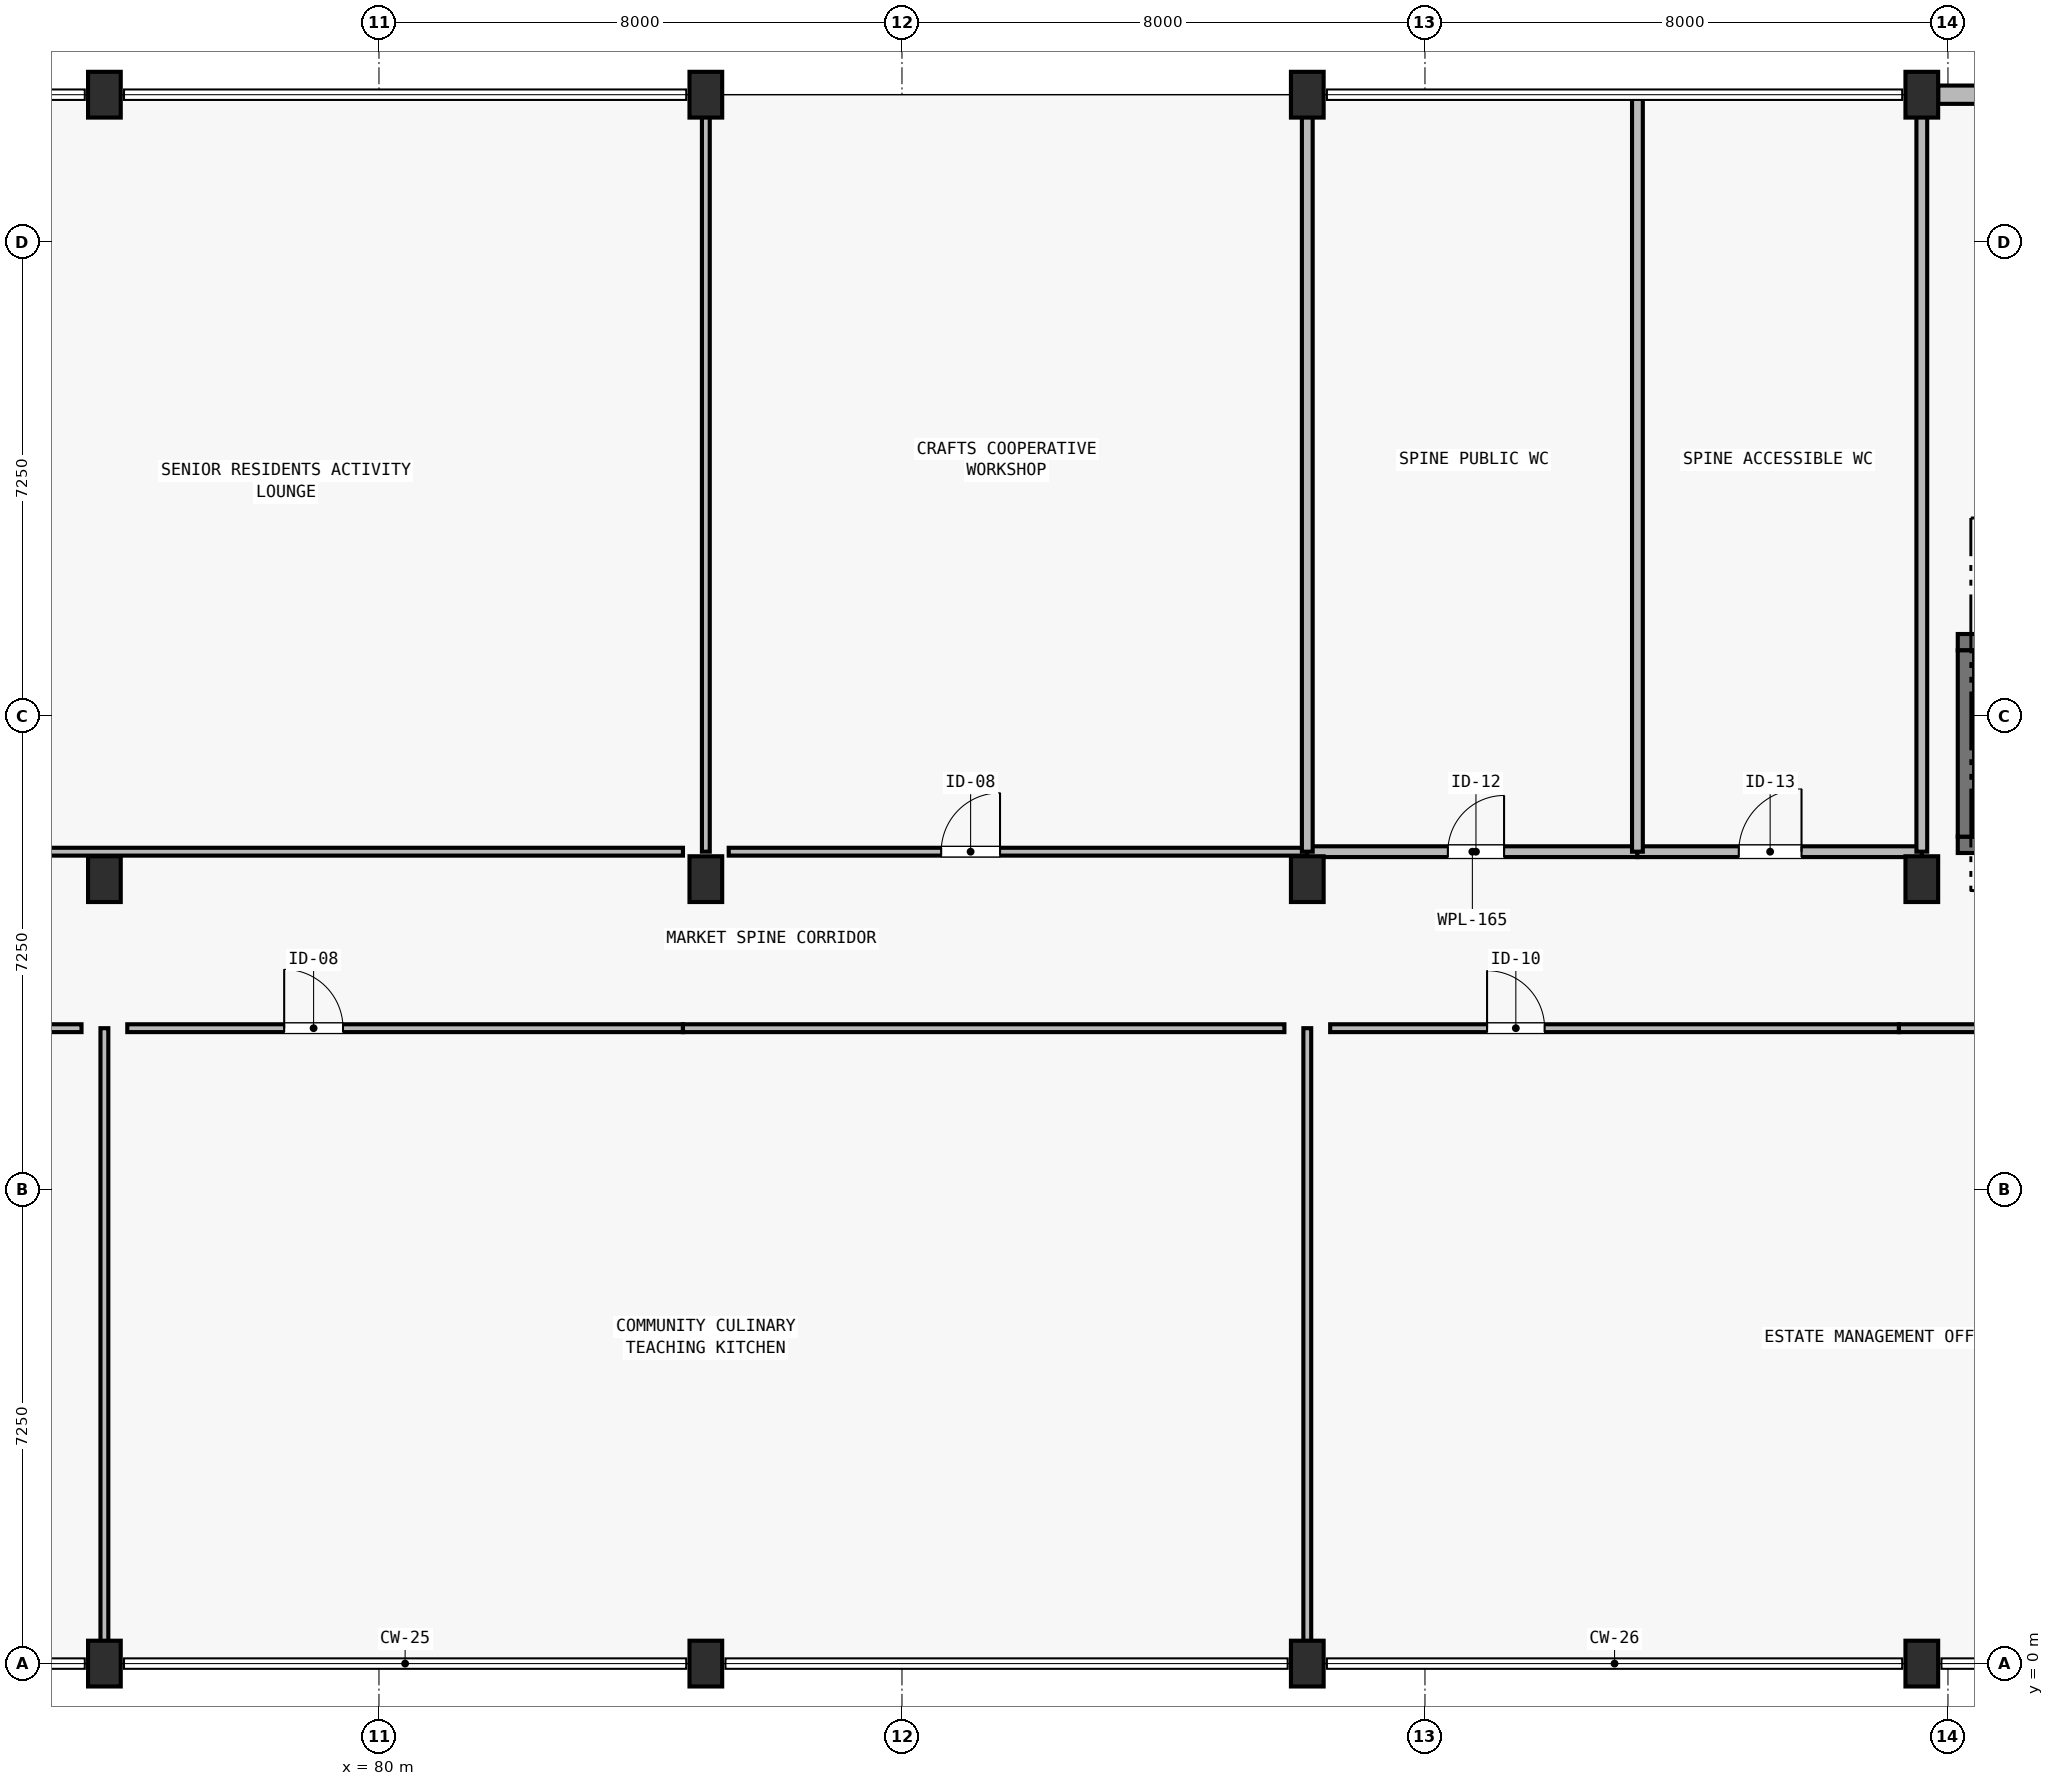
"""IFC4 building model, lengths in metres.
Left out: names, types, materials, properties, quantities, classifications, styles, units other than length and angle.
Written with IfcOpenShell. Run it as: python <this file> out.ifc"""

import sys

from ifc_helpers import new_model, si_unit, direction, frame, frame_2d, origin, origin_2d, place, context, subcontext, project, spatial, rectangle, extrude, element, fill, save


model = new_model("IFC4")
c1 = context("Model", 3, precision=1e-05, world=origin(), true_north=direction((0.0, 1.0)))
c2 = subcontext(c1, "Body", "Model", "MODEL_VIEW")
j1 = project(units=[si_unit("LENGTHUNIT", "METRE"), si_unit("PLANEANGLEUNIT", "RADIAN")], contexts=[c1])
p1 = place(None, origin())
s1 = spatial("IfcSite", under=j1, at=p1, CompositionType="ELEMENT")
p2 = place(p1, origin())
s2 = spatial("IfcBuilding", under=s1, at=p2, CompositionType="ELEMENT")
p3 = place(p2, frame((0.0, 0.0, 4.5)))
s3 = spatial("IfcBuildingStorey", under=s2, at=p3, CompositionType="ELEMENT", Elevation=4.5)
p4 = place(p3, frame((104.15, 12.525, 0.0), z_axis=(0.0, 0.0, 1.0), x_axis=(1.0, 0.0, 0.0)))
e1 = element("IfcWall", 1, at=p4, inside=s3, PredefinedType="SHEAR", context=c2, shape_type="SweptSolid", body=[
    extrude(rectangle(XDim=7.3, YDim=0.25, at=frame_2d((3.65, 0.0))), origin(), (0.0, 0.0, 1.0), 3.9),
])
p5 = place(p4, frame((0.45, 0.0, 0.0)))
e2 = element("IfcOpeningElement", 2, at=p5, cuts=e1, PredefinedType="OPENING", context=c2, shape_type="SweptSolid", body=[
    extrude(rectangle(XDim=1.05, YDim=2.15, at=frame_2d((0.525, 1.075))), frame((0.0, 0.14, 0.0), z_axis=(0.0, -1.0, 0.0), x_axis=(1.0, 0.0, 0.0)), (0.0, 0.0, 1.0), 0.28),
])
p6 = place(p3, frame((104.15, 15.625, 0.0), z_axis=(0.0, 0.0, 1.0), x_axis=(1.0, 0.0, 0.0)))
e3 = element("IfcWall", 3, at=p6, inside=s3, PredefinedType="SHEAR", context=c2, shape_type="SweptSolid", body=[
    extrude(rectangle(XDim=7.3, YDim=0.25, at=frame_2d((3.65, 0.0))), origin(), (0.0, 0.0, 1.0), 3.9),
])
p7 = place(p6, frame((0.45, 0.0, 0.0)))
e4 = element("IfcOpeningElement", 4, at=p7, cuts=e3, PredefinedType="OPENING", context=c2, shape_type="SweptSolid", body=[
    extrude(rectangle(XDim=1.12, YDim=2.15, at=frame_2d((0.56, 1.075))), frame((0.0, 0.14, 0.0), z_axis=(0.0, -1.0, 0.0), x_axis=(1.0, 0.0, 0.0)), (0.0, 0.0, 1.0), 0.28),
])
p8 = place(p3, frame((104.275, 12.65, 0.0), z_axis=(0.0, 0.0, 1.0), x_axis=(0.0, 1.0, 0.0)))
e5 = element("IfcWall", 5, at=p8, inside=s3, PredefinedType="SHEAR", context=c2, shape_type="SweptSolid", body=[
    extrude(rectangle(XDim=2.85, YDim=0.25, at=frame_2d((1.425, 0.0))), origin(), (0.0, 0.0, 1.0), 3.9),
])
for number, where, z_axis, x_axis in (
    (6, (75.8, 0.0, 0.0), (0.0, 0.0, 1.0), (1.0, 0.0, 0.0)),
    (7, (75.8, 12.0, 0.0), (0.0, 0.0, 1.0), (1.0, 0.0, 0.0)),
    (8, (75.8, 24.0, 0.0), (0.0, 0.0, 1.0), (1.0, 0.0, 0.0)),
    (9, (85.0, 0.0, 0.0), (0.0, 0.0, 1.0), (1.0, 0.0, 0.0)),
    (10, (85.0, 12.0, 0.0), (0.0, 0.0, 1.0), (1.0, 0.0, 0.0)),
    (11, (85.0, 24.0, 0.0), (0.0, 0.0, 1.0), (1.0, 0.0, 0.0)),
    (12, (94.2, 0.0, 0.0), (0.0, 0.0, 1.0), (1.0, 0.0, 0.0)),
    (13, (94.2, 12.0, 0.0), (0.0, 0.0, 1.0), (1.0, 0.0, 0.0)),
    (14, (94.2, 24.0, 0.0), (0.0, 0.0, 1.0), (1.0, 0.0, 0.0)),
    (15, (103.6, 0.0, 0.0), (0.0, 0.0, 1.0), (1.0, 0.0, 0.0)),
    (16, (103.6, 12.0, 0.0), (0.0, 0.0, 1.0), (1.0, 0.0, 0.0)),
    (17, (103.6, 24.0, 0.0), (0.0, 0.0, 1.0), (1.0, 0.0, 0.0)),
):
    element("IfcColumn", number, at=place(p3, frame(where, z_axis=z_axis, x_axis=x_axis)), inside=s3, PredefinedType="COLUMN", context=c2, shape_type="SweptSolid", body=[
        extrude(rectangle(XDim=0.5, YDim=0.7, at=origin_2d()), origin(), (0.0, 0.0, 1.0), 3.9),
    ])
p9 = place(p3, frame((103.85, 24.0, 0.0), z_axis=(0.0, 0.0, 1.0), x_axis=(1.0, 0.0, 0.0)))
e18 = element("IfcWall", 18, at=p9, inside=s3, PredefinedType="SOLIDWALL", context=c2, shape_type="SweptSolid", body=[
    extrude(rectangle(XDim=7.9, YDim=0.28, at=frame_2d((3.95, 0.0))), origin(), (0.0, 0.0, 1.0), 2.99),
])
p10 = place(p9, frame((3.6, 0.0, 0.42)))
e19 = element("IfcOpeningElement", 19, at=p10, cuts=e18, PredefinedType="OPENING", context=c2, shape_type="SweptSolid", body=[
    extrude(rectangle(XDim=0.7, YDim=2.14, at=frame_2d((0.35, 1.07))), frame((0.0, 0.155, 0.0), z_axis=(0.0, -1.0, 0.0), x_axis=(1.0, 0.0, 0.0)), (0.0, 0.0, 1.0), 0.31),
])
p11 = place(p3, frame((68.05, 9.72, 0.0), z_axis=(0.0, 0.0, 1.0), x_axis=(1.0, 0.0, 0.0)))
e20 = element("IfcWall", 20, at=p11, inside=s3, PredefinedType="PARTITIONING", context=c2, shape_type="SweptSolid", body=[
    extrude(rectangle(XDim=7.4, YDim=0.12, at=frame_2d((3.7, 0.0))), origin(), (0.0, 0.0, 1.0), 3.63),
])
p12 = place(p3, frame((76.15, 9.72, 0.0), z_axis=(0.0, 0.0, 1.0), x_axis=(1.0, 0.0, 0.0)))
e21 = element("IfcWall", 21, at=p12, inside=s3, PredefinedType="PARTITIONING", context=c2, shape_type="SweptSolid", body=[
    extrude(rectangle(XDim=8.5, YDim=0.12, at=frame_2d((4.25, 0.0))), origin(), (0.0, 0.0, 1.0), 3.63),
])
p13 = place(p12, frame((2.4, 0.0, 0.0)))
e22 = element("IfcOpeningElement", 22, at=p13, cuts=e21, PredefinedType="OPENING", context=c2, shape_type="SweptSolid", body=[
    extrude(rectangle(XDim=0.9, YDim=2.1, at=frame_2d((0.45, 1.05))), frame((0.0, 0.075, 0.0), z_axis=(0.0, -1.0, 0.0), x_axis=(1.0, 0.0, 0.0)), (0.0, 0.0, 1.0), 0.15),
])
p14 = place(p3, frame((84.65, 9.72, 0.0), z_axis=(0.0, 0.0, 1.0), x_axis=(1.0, 0.0, 0.0)))
e23 = element("IfcWall", 23, at=p14, inside=s3, PredefinedType="PARTITIONING", context=c2, shape_type="SweptSolid", body=[
    extrude(rectangle(XDim=9.2, YDim=0.12, at=frame_2d((4.6, 0.0))), origin(), (0.0, 0.0, 1.0), 3.63),
])
p15 = place(p3, frame((94.55, 9.72, 0.0), z_axis=(0.0, 0.0, 1.0), x_axis=(1.0, 0.0, 0.0)))
e24 = element("IfcWall", 24, at=p15, inside=s3, PredefinedType="PARTITIONING", context=c2, shape_type="SweptSolid", body=[
    extrude(rectangle(XDim=8.7, YDim=0.12, at=frame_2d((4.35, 0.0))), origin(), (0.0, 0.0, 1.0), 3.63),
])
p16 = place(p15, frame((2.4, 0.0, 0.0)))
e25 = element("IfcOpeningElement", 25, at=p16, cuts=e24, PredefinedType="OPENING", context=c2, shape_type="SweptSolid", body=[
    extrude(rectangle(XDim=0.88, YDim=2.1, at=frame_2d((0.44, 1.05))), frame((0.0, 0.075, 0.0), z_axis=(0.0, -1.0, 0.0), x_axis=(1.0, 0.0, 0.0)), (0.0, 0.0, 1.0), 0.15),
])
p17 = place(p3, frame((103.25, 9.72, 0.0), z_axis=(0.0, 0.0, 1.0), x_axis=(1.0, 0.0, 0.0)))
e26 = element("IfcWall", 26, at=p17, inside=s3, PredefinedType="PARTITIONING", context=c2, shape_type="SweptSolid", body=[
    extrude(rectangle(XDim=8.6, YDim=0.12, at=frame_2d((4.3, 0.0))), origin(), (0.0, 0.0, 1.0), 3.63),
])
for number, where, z_axis, x_axis in (
    (27, (75.8, 0.12, 0.0), (0.0, 0.0, 1.0), (0.0, 1.0, 0.0)),
    (28, (94.2, 0.12, 0.0), (0.0, 0.0, 1.0), (0.0, 1.0, 0.0)),
):
    element("IfcWall", number, at=place(p3, frame(where, z_axis=z_axis, x_axis=x_axis)), inside=s3, PredefinedType="PARTITIONING", context=c2, shape_type="SweptSolid", body=[
        extrude(rectangle(XDim=9.6, YDim=0.12, at=frame_2d((4.8, 0.0))), origin(), (0.0, 0.0, 1.0), 3.0),
    ])
p18 = place(p3, frame((68.4, 12.42, 0.0), z_axis=(0.0, 0.0, 1.0), x_axis=(1.0, 0.0, 0.0)))
e29 = element("IfcWall", 29, at=p18, inside=s3, PredefinedType="PARTITIONING", context=c2, shape_type="SweptSolid", body=[
    extrude(rectangle(XDim=16.25, YDim=0.12, at=frame_2d((8.125, 0.0))), origin(), (0.0, 0.0, 1.0), 3.63),
])
p19 = place(p18, frame((5.4, 0.0, 0.0)))
e30 = element("IfcOpeningElement", 30, at=p19, cuts=e29, PredefinedType="OPENING", context=c2, shape_type="SweptSolid", body=[
    extrude(rectangle(XDim=1.15, YDim=2.15, at=frame_2d((0.575, 1.075))), frame((0.0, 0.075, 0.0), z_axis=(0.0, -1.0, 0.0), x_axis=(1.0, 0.0, 0.0)), (0.0, 0.0, 1.0), 0.15),
])
p20 = place(p3, frame((85.35, 12.42, 0.0), z_axis=(0.0, 0.0, 1.0), x_axis=(1.0, 0.0, 0.0)))
e31 = element("IfcWall", 31, at=p20, inside=s3, PredefinedType="PARTITIONING", context=c2, shape_type="SweptSolid", body=[
    extrude(rectangle(XDim=8.85, YDim=0.12, at=frame_2d((4.425, 0.0))), origin(), (0.0, 0.0, 1.0), 3.63),
])
p21 = place(p20, frame((3.25, 0.0, 0.0)))
e32 = element("IfcOpeningElement", 32, at=p21, cuts=e31, PredefinedType="OPENING", context=c2, shape_type="SweptSolid", body=[
    extrude(rectangle(XDim=0.9, YDim=2.1, at=frame_2d((0.45, 1.05))), frame((0.0, 0.075, 0.0), z_axis=(0.0, -1.0, 0.0), x_axis=(1.0, 0.0, 0.0)), (0.0, 0.0, 1.0), 0.15),
])
p22 = place(p3, frame((94.2, 12.42, 0.0), z_axis=(0.0, 0.0, 1.0), x_axis=(1.0, 0.0, 0.0)))
e33 = element("IfcWall", 33, at=p22, inside=s3, PredefinedType="PLUMBINGWALL", context=c2, shape_type="SweptSolid", body=[
    extrude(rectangle(XDim=5.05, YDim=0.165, at=frame_2d((2.525, 0.0))), origin(), (0.0, 0.0, 1.0), 3.63),
])
p23 = place(p22, frame((2.15, 0.0, 0.0)))
e34 = element("IfcOpeningElement", 34, at=p23, cuts=e33, PredefinedType="OPENING", context=c2, shape_type="SweptSolid", body=[
    extrude(rectangle(XDim=0.86, YDim=2.1, at=frame_2d((0.43, 1.05))), frame((0.0, 0.097, 0.0), z_axis=(0.0, -1.0, 0.0), x_axis=(1.0, 0.0, 0.0)), (0.0, 0.0, 1.0), 0.195),
])
p24 = place(p3, frame((99.25, 12.42, 0.0), z_axis=(0.0, 0.0, 1.0), x_axis=(1.0, 0.0, 0.0)))
e35 = element("IfcWall", 35, at=p24, inside=s3, PredefinedType="PLUMBINGWALL", context=c2, shape_type="SweptSolid", body=[
    extrude(rectangle(XDim=4.35, YDim=0.165, at=frame_2d((2.175, 0.0))), origin(), (0.0, 0.0, 1.0), 3.63),
])
p25 = place(p24, frame((1.55, 0.0, 0.0)))
e36 = element("IfcOpeningElement", 36, at=p25, cuts=e35, PredefinedType="OPENING", context=c2, shape_type="SweptSolid", body=[
    extrude(rectangle(XDim=0.96, YDim=2.12, at=frame_2d((0.48, 1.06))), frame((0.0, 0.097, 0.0), z_axis=(0.0, -1.0, 0.0), x_axis=(1.0, 0.0, 0.0)), (0.0, 0.0, 1.0), 0.195),
])
p26 = place(p3, frame((85.0, 12.42, 0.0), z_axis=(0.0, 0.0, 1.0), x_axis=(0.0, 1.0, 0.0)))
e37 = element("IfcWall", 37, at=p26, inside=s3, PredefinedType="PARTITIONING", context=c2, shape_type="SweptSolid", body=[
    extrude(rectangle(XDim=11.54, YDim=0.12, at=frame_2d((5.77, 0.0))), origin(), (0.0, 0.0, 1.0), 3.0),
])
p27 = place(p3, frame((94.2, 12.42, 0.0), z_axis=(0.0, 0.0, 1.0), x_axis=(0.0, 1.0, 0.0)))
e38 = element("IfcWall", 38, at=p27, inside=s3, PredefinedType="PLUMBINGWALL", context=c2, shape_type="SweptSolid", body=[
    extrude(rectangle(XDim=11.54, YDim=0.165, at=frame_2d((5.77, 0.0))), origin(), (0.0, 0.0, 1.0), 3.0),
])
p28 = place(p3, frame((99.25, 12.42, 0.0), z_axis=(0.0, 0.0, 1.0), x_axis=(0.0, 1.0, 0.0)))
e39 = element("IfcWall", 39, at=p28, inside=s3, PredefinedType="PLUMBINGWALL", context=c2, shape_type="SweptSolid", body=[
    extrude(rectangle(XDim=11.54, YDim=0.165, at=frame_2d((5.77, 0.0))), origin(), (0.0, 0.0, 1.0), 3.63),
])
p29 = place(p3, frame((103.6, 12.42, 0.0), z_axis=(0.0, 0.0, 1.0), x_axis=(0.0, 1.0, 0.0)))
e40 = element("IfcWall", 40, at=p29, inside=s3, PredefinedType="PLUMBINGWALL", context=c2, shape_type="SweptSolid", body=[
    extrude(rectangle(XDim=11.54, YDim=0.165, at=frame_2d((5.77, 0.0))), origin(), (0.0, 0.0, 1.0), 3.0),
])
p30 = place(p13, origin())
e41 = element("IfcDoor", 41, at=p30, inside=s3, OperationType="SINGLE_SWING_LEFT", PredefinedType="DOOR", context=c2, shape_type="SweptSolid", body=[
    extrude(rectangle(XDim=0.9, YDim=2.1, at=frame_2d((0.45, 1.05))), frame((0.0, 0.025, 0.0), z_axis=(0.0, -1.0, 0.0), x_axis=(1.0, 0.0, 0.0)), (0.0, 0.0, 1.0), 0.05),
])
fill(e22, e41)
p31 = place(p16, origin())
e42 = element("IfcDoor", 42, at=p31, inside=s3, OperationType="SINGLE_SWING_LEFT", PredefinedType="DOOR", context=c2, shape_type="SweptSolid", body=[
    extrude(rectangle(XDim=0.88, YDim=2.1, at=frame_2d((0.44, 1.05))), frame((0.0, 0.025, 0.0), z_axis=(0.0, -1.0, 0.0), x_axis=(1.0, 0.0, 0.0)), (0.0, 0.0, 1.0), 0.05),
])
fill(e25, e42)
p32 = place(p21, origin())
e43 = element("IfcDoor", 43, at=p32, inside=s3, OperationType="SINGLE_SWING_RIGHT", PredefinedType="DOOR", context=c2, shape_type="SweptSolid", body=[
    extrude(rectangle(XDim=0.9, YDim=2.1, at=frame_2d((0.45, 1.05))), frame((0.0, 0.025, 0.0), z_axis=(0.0, -1.0, 0.0), x_axis=(1.0, 0.0, 0.0)), (0.0, 0.0, 1.0), 0.05),
])
fill(e32, e43)
p33 = place(p23, origin())
e44 = element("IfcDoor", 44, at=p33, inside=s3, OperationType="SINGLE_SWING_RIGHT", PredefinedType="DOOR", context=c2, shape_type="SweptSolid", body=[
    extrude(rectangle(XDim=0.86, YDim=2.1, at=frame_2d((0.43, 1.05))), frame((0.0, 0.025, 0.0), z_axis=(0.0, -1.0, 0.0), x_axis=(1.0, 0.0, 0.0)), (0.0, 0.0, 1.0), 0.05),
])
fill(e34, e44)
p34 = place(p25, origin())
e45 = element("IfcDoor", 45, at=p34, inside=s3, OperationType="SINGLE_SWING_RIGHT", PredefinedType="DOOR", context=c2, shape_type="SweptSolid", body=[
    extrude(rectangle(XDim=0.96, YDim=2.12, at=frame_2d((0.48, 1.06))), frame((0.0, 0.025, 0.0), z_axis=(0.0, -1.0, 0.0), x_axis=(1.0, 0.0, 0.0)), (0.0, 0.0, 1.0), 0.05),
])
fill(e36, e45)
save(model, sys.argv[1])
